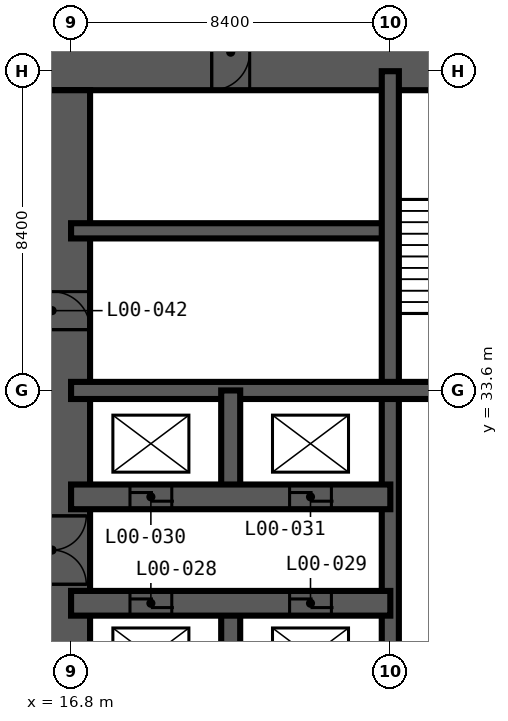
"""IFC4 building model, lengths in metres.
Left out: names, types, materials, properties, quantities, classifications, styles, units other than length and angle.
Written with IfcOpenShell. Run it as: python <this file> out.ifc"""

import sys

from ifc_helpers import new_model, si_unit, direction, frame, frame_2d, origin, place, context, subcontext, project, spatial, rectangle, extrude, element, fill, save


model = new_model("IFC4")
c1 = context("Model", 3, precision=1e-05, world=origin(), true_north=direction((0.0, 1.0)))
c2 = subcontext(c1, "Body", "Model", "MODEL_VIEW")
j1 = project(units=[si_unit("LENGTHUNIT", "METRE"), si_unit("PLANEANGLEUNIT", "RADIAN")], contexts=[c1])
p1 = place(None, origin())
s1 = spatial("IfcSite", under=j1, at=p1, CompositionType="ELEMENT")
p2 = place(p1, origin())
s2 = spatial("IfcBuilding", under=s1, at=p2, CompositionType="ELEMENT")
p3 = place(p2, origin())
s3 = spatial("IfcBuildingStorey", under=s2, at=p3, CompositionType="ELEMENT", Elevation=0.0)
p4 = place(p3, frame((43.5, 42.5, -0.3), z_axis=(0.0, 0.0, 1.0), x_axis=(-1.0, 0.0, 0.0)))
e1 = element("IfcWall", 1, at=p4, inside=s3, PredefinedType="SHEAR", context=c2, shape_type="SweptSolid", body=[
    extrude(rectangle(XDim=28.2, YDim=2.0, at=frame_2d((14.1, 0.0))), origin(), (0.0, 0.0, 1.0), 6.0),
])
p5 = place(p4, frame((22.0, 0.0, 0.3)))
e2 = element("IfcOpeningElement", 2, at=p5, cuts=e1, PredefinedType="OPENING", context=c2, shape_type="SweptSolid", body=[
    extrude(rectangle(XDim=1.0, YDim=2.1, at=frame_2d((0.5, 1.05))), frame((0.0, 1.01, 0.0), z_axis=(0.0, -1.0, 0.0), x_axis=(1.0, 0.0, 0.0)), (0.0, 0.0, 1.0), 2.02),
])
p6 = place(p4, frame((11.4, 0.0, 0.3)))
e3 = element("IfcOpeningElement", 3, at=p6, cuts=e1, PredefinedType="OPENING", context=c2, shape_type="SweptSolid", body=[
    extrude(rectangle(XDim=1.2, YDim=2.2, at=frame_2d((0.6, 1.1))), frame((0.0, 1.01, 0.0), z_axis=(0.0, -1.0, 0.0), x_axis=(1.0, 0.0, 0.0)), (0.0, 0.0, 1.0), 2.02),
])
p7 = place(p3, frame((16.3, 41.5, -0.3), z_axis=(0.0, 0.0, 1.0), x_axis=(0.0, -1.0, 0.0)))
e4 = element("IfcWall", 4, at=p7, inside=s3, PredefinedType="SHEAR", context=c2, shape_type="SweptSolid", body=[
    extrude(rectangle(XDim=24.2, YDim=2.0, at=frame_2d((12.1, 0.0))), origin(), (0.0, 0.0, 1.0), 6.0),
])
p8 = place(p7, frame((11.2, 0.0, 0.3)))
e5 = element("IfcOpeningElement", 5, at=p8, cuts=e4, PredefinedType="OPENING", context=c2, shape_type="SweptSolid", body=[
    extrude(rectangle(XDim=1.8, YDim=2.2, at=frame_2d((0.9, 1.1))), frame((0.0, 1.01, 0.0), z_axis=(0.0, -1.0, 0.0), x_axis=(1.0, 0.0, 0.0)), (0.0, 0.0, 1.0), 2.02),
])
p9 = place(p7, frame((19.6, 0.0, 0.3)))
e6 = element("IfcOpeningElement", 6, at=p9, cuts=e4, PredefinedType="OPENING", context=c2, shape_type="SweptSolid", body=[
    extrude(rectangle(XDim=1.8, YDim=2.2, at=frame_2d((0.9, 1.1))), frame((0.0, 1.01, 0.0), z_axis=(0.0, -1.0, 0.0), x_axis=(1.0, 0.0, 0.0)), (0.0, 0.0, 1.0), 2.02),
])
p10 = place(p7, frame((5.3, 0.0, 0.3)))
e7 = element("IfcOpeningElement", 7, at=p10, cuts=e4, PredefinedType="OPENING", context=c2, shape_type="SweptSolid", body=[
    extrude(rectangle(XDim=1.0, YDim=2.1, at=frame_2d((0.5, 1.05))), frame((0.0, 1.01, 0.0), z_axis=(0.0, -1.0, 0.0), x_axis=(1.0, 0.0, 0.0)), (0.0, 0.0, 1.0), 2.02),
])
p11 = place(p3, frame((16.8, 37.8, -0.3), z_axis=(0.0, 0.0, 1.0), x_axis=(1.0, 0.0, 0.0)))
e8 = element("IfcWall", 8, at=p11, inside=s3, PredefinedType="SHEAR", context=c2, shape_type="SweptSolid", body=[
    extrude(rectangle(XDim=8.4, YDim=0.4, at=frame_2d((4.2, 0.0))), origin(), (0.0, 0.0, 1.0), 6.0),
])
p12 = place(p3, frame((25.2, 16.8, -0.3), z_axis=(0.0, 0.0, 1.0), x_axis=(0.0, 1.0, 0.0)))
e9 = element("IfcWall", 9, at=p12, inside=s3, PredefinedType="SHEAR", context=c2, shape_type="SweptSolid", body=[
    extrude(rectangle(XDim=25.2, YDim=0.45, at=frame_2d((12.6, 0.0))), origin(), (0.0, 0.0, 1.0), 6.0),
])
p13 = place(p3, frame((16.8, 33.6, -0.3), z_axis=(0.0, 0.0, 1.0), x_axis=(1.0, 0.0, 0.0)))
e10 = element("IfcWall", 10, at=p13, inside=s3, PredefinedType="SHEAR", context=c2, shape_type="SweptSolid", body=[
    extrude(rectangle(XDim=25.2, YDim=0.45, at=frame_2d((12.6, 0.0))), origin(), (0.0, 0.0, 1.0), 6.0),
])
p14 = place(p13, frame((14.2, 0.0, 0.3)))
e11 = element("IfcOpeningElement", 11, at=p14, cuts=e10, PredefinedType="OPENING", context=c2, shape_type="SweptSolid", body=[
    extrude(rectangle(XDim=1.0, YDim=2.1, at=frame_2d((0.5, 1.05))), frame((0.0, 0.235, 0.0), z_axis=(0.0, -1.0, 0.0), x_axis=(1.0, 0.0, 0.0)), (0.0, 0.0, 1.0), 0.47),
])
p15 = place(p13, frame((22.6, 0.0, 0.3)))
e12 = element("IfcOpeningElement", 12, at=p15, cuts=e10, PredefinedType="OPENING", context=c2, shape_type="SweptSolid", body=[
    extrude(rectangle(XDim=1.0, YDim=2.1, at=frame_2d((0.5, 1.05))), frame((0.0, 0.235, 0.0), z_axis=(0.0, -1.0, 0.0), x_axis=(1.0, 0.0, 0.0)), (0.0, 0.0, 1.0), 0.47),
])
for number, where, z_axis, x_axis in (
    (13, (21.0, 25.2, -0.3), (0.0, 0.0, 1.0), (0.0, 1.0, 0.0)),
    (14, (21.0, 30.8, -0.3), (0.0, 0.0, 1.0), (0.0, 1.0, 0.0)),
):
    element("IfcWall", number, at=place(p3, frame(where, z_axis=z_axis, x_axis=x_axis)), inside=s3, PredefinedType="SHEAR", context=c2, shape_type="SweptSolid", body=[
        extrude(rectangle(XDim=2.8, YDim=0.5, at=frame_2d((1.4, 0.0))), origin(), (0.0, 0.0, 1.0), 6.0),
    ])
p16 = place(p3, frame((16.8, 28.0, -0.3), z_axis=(0.0, 0.0, 1.0), x_axis=(1.0, 0.0, 0.0)))
e15 = element("IfcWall", 15, at=p16, inside=s3, PredefinedType="SHEAR", context=c2, shape_type="SweptSolid", body=[
    extrude(rectangle(XDim=8.4, YDim=0.65, at=frame_2d((4.2, 0.0))), origin(), (0.0, 0.0, 1.0), 6.0),
])
p17 = place(p16, frame((1.55, 0.0, 0.3)))
e16 = element("IfcOpeningElement", 16, at=p17, cuts=e15, PredefinedType="OPENING", context=c2, shape_type="SweptSolid", body=[
    extrude(rectangle(XDim=1.1, YDim=2.2, at=frame_2d((0.55, 1.1))), frame((0.0, 0.335, 0.0), z_axis=(0.0, -1.0, 0.0), x_axis=(1.0, 0.0, 0.0)), (0.0, 0.0, 1.0), 0.67),
])
p18 = place(p16, frame((5.75, 0.0, 0.3)))
e17 = element("IfcOpeningElement", 17, at=p18, cuts=e15, PredefinedType="OPENING", context=c2, shape_type="SweptSolid", body=[
    extrude(rectangle(XDim=1.1, YDim=2.2, at=frame_2d((0.55, 1.1))), frame((0.0, 0.335, 0.0), z_axis=(0.0, -1.0, 0.0), x_axis=(1.0, 0.0, 0.0)), (0.0, 0.0, 1.0), 0.67),
])
p19 = place(p3, frame((16.8, 30.8, -0.3), z_axis=(0.0, 0.0, 1.0), x_axis=(1.0, 0.0, 0.0)))
e18 = element("IfcWall", 18, at=p19, inside=s3, PredefinedType="SHEAR", context=c2, shape_type="SweptSolid", body=[
    extrude(rectangle(XDim=8.4, YDim=0.65, at=frame_2d((4.2, 0.0))), origin(), (0.0, 0.0, 1.0), 6.0),
])
p20 = place(p19, frame((1.55, 0.0, 0.3)))
e19 = element("IfcOpeningElement", 19, at=p20, cuts=e18, PredefinedType="OPENING", context=c2, shape_type="SweptSolid", body=[
    extrude(rectangle(XDim=1.1, YDim=2.2, at=frame_2d((0.55, 1.1))), frame((0.0, 0.335, 0.0), z_axis=(0.0, -1.0, 0.0), x_axis=(1.0, 0.0, 0.0)), (0.0, 0.0, 1.0), 0.67),
])
p21 = place(p19, frame((5.75, 0.0, 0.3)))
e20 = element("IfcOpeningElement", 20, at=p21, cuts=e18, PredefinedType="OPENING", context=c2, shape_type="SweptSolid", body=[
    extrude(rectangle(XDim=1.1, YDim=2.2, at=frame_2d((0.55, 1.1))), frame((0.0, 0.335, 0.0), z_axis=(0.0, -1.0, 0.0), x_axis=(1.0, 0.0, 0.0)), (0.0, 0.0, 1.0), 0.67),
])
p22 = place(p17, origin())
e21 = element("IfcDoor", 21, at=p22, inside=s3, OperationType="DOUBLE_DOOR_SLIDING", PredefinedType="DOOR", context=c2, shape_type="SweptSolid", body=[
    extrude(rectangle(XDim=1.1, YDim=2.2, at=frame_2d((0.55, 1.1))), frame((0.0, 0.025, 0.0), z_axis=(0.0, -1.0, 0.0), x_axis=(1.0, 0.0, 0.0)), (0.0, 0.0, 1.0), 0.05),
])
fill(e16, e21)
p23 = place(p18, origin())
e22 = element("IfcDoor", 22, at=p23, inside=s3, OperationType="DOUBLE_DOOR_SLIDING", PredefinedType="DOOR", context=c2, shape_type="SweptSolid", body=[
    extrude(rectangle(XDim=1.1, YDim=2.2, at=frame_2d((0.55, 1.1))), frame((0.0, 0.025, 0.0), z_axis=(0.0, -1.0, 0.0), x_axis=(1.0, 0.0, 0.0)), (0.0, 0.0, 1.0), 0.05),
])
fill(e17, e22)
p24 = place(p20, origin())
e23 = element("IfcDoor", 23, at=p24, inside=s3, OperationType="DOUBLE_DOOR_SLIDING", PredefinedType="DOOR", context=c2, shape_type="SweptSolid", body=[
    extrude(rectangle(XDim=1.1, YDim=2.2, at=frame_2d((0.55, 1.1))), frame((0.0, 0.025, 0.0), z_axis=(0.0, -1.0, 0.0), x_axis=(1.0, 0.0, 0.0)), (0.0, 0.0, 1.0), 0.05),
])
fill(e19, e23)
p25 = place(p21, origin())
e24 = element("IfcDoor", 24, at=p25, inside=s3, OperationType="DOUBLE_DOOR_SLIDING", PredefinedType="DOOR", context=c2, shape_type="SweptSolid", body=[
    extrude(rectangle(XDim=1.1, YDim=2.2, at=frame_2d((0.55, 1.1))), frame((0.0, 0.025, 0.0), z_axis=(0.0, -1.0, 0.0), x_axis=(1.0, 0.0, 0.0)), (0.0, 0.0, 1.0), 0.05),
])
fill(e20, e24)
p26 = place(p8, origin())
e25 = element("IfcDoor", 25, at=p26, inside=s3, OperationType="DOUBLE_DOOR_DOUBLE_SWING", PredefinedType="DOOR", context=c2, shape_type="SweptSolid", body=[
    extrude(rectangle(XDim=1.8, YDim=2.2, at=frame_2d((0.9, 1.1))), frame((0.0, 0.025, 0.0), z_axis=(0.0, -1.0, 0.0), x_axis=(1.0, 0.0, 0.0)), (0.0, 0.0, 1.0), 0.05),
])
fill(e5, e25)
p27 = place(p10, origin())
e26 = element("IfcDoor", 26, at=p27, inside=s3, OperationType="SINGLE_SWING_RIGHT", PredefinedType="DOOR", context=c2, shape_type="SweptSolid", body=[
    extrude(rectangle(XDim=1.0, YDim=2.1, at=frame_2d((0.5, 1.05))), frame((0.0, 0.025, 0.0), z_axis=(0.0, -1.0, 0.0), x_axis=(1.0, 0.0, 0.0)), (0.0, 0.0, 1.0), 0.05),
])
fill(e7, e26)
p28 = place(p5, origin())
e27 = element("IfcDoor", 27, at=p28, inside=s3, OperationType="SINGLE_SWING_RIGHT", PredefinedType="DOOR", context=c2, shape_type="SweptSolid", body=[
    extrude(rectangle(XDim=1.0, YDim=2.1, at=frame_2d((0.5, 1.05))), frame((0.0, 0.025, 0.0), z_axis=(0.0, -1.0, 0.0), x_axis=(1.0, 0.0, 0.0)), (0.0, 0.0, 1.0), 0.05),
])
fill(e2, e27)
save(model, sys.argv[1])
